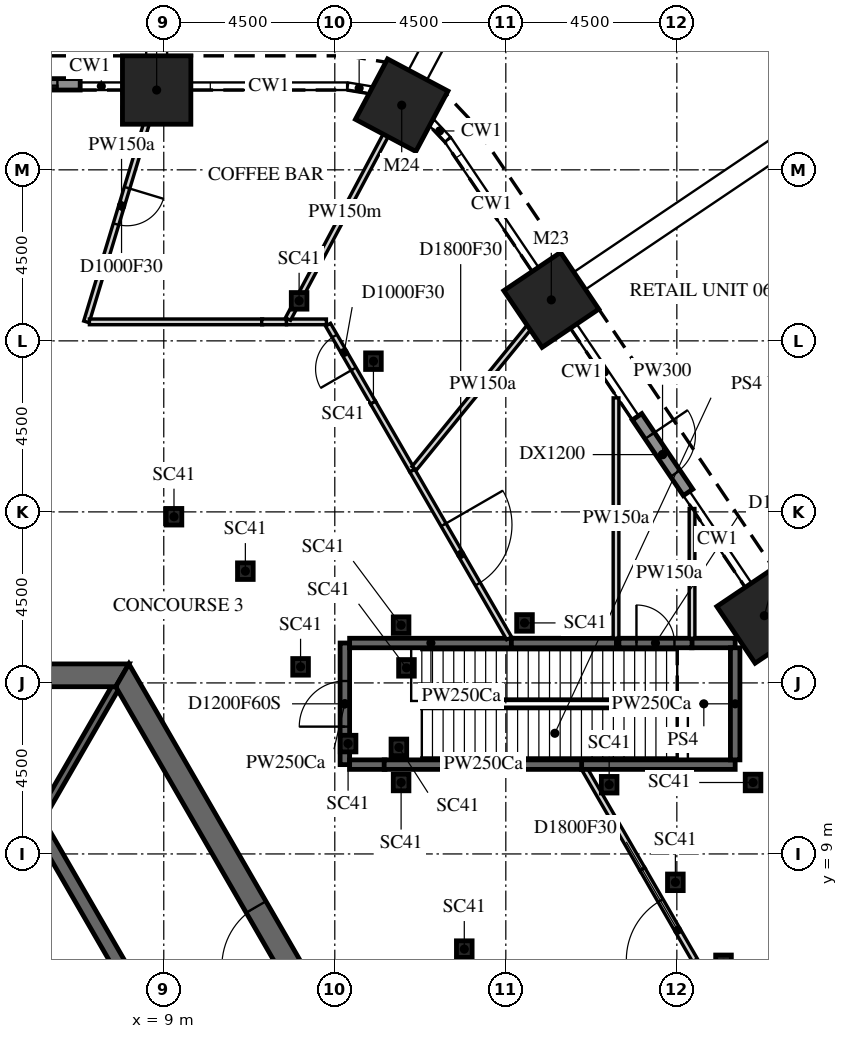
"""IFC4 building model, lengths in metres.
Left out: names, types, materials, properties, quantities, classifications, styles, units other than length and angle.
Written with IfcOpenShell. Run it as: python <this file> out.ifc"""

import sys

from ifc_helpers import new_model, si_unit, direction, frame, frame_2d, origin, origin_2d, place, context, subcontext, project, spatial, polyline, rectangle, i_section, outline, extrude, element, fill, save


model = new_model("IFC4")
c1 = context("Model", 3, precision=1e-05, world=origin(), true_north=direction((0.0, 1.0)))
c2 = subcontext(c1, "Body", "Model", "MODEL_VIEW")
j1 = project(units=[si_unit("LENGTHUNIT", "METRE"), si_unit("PLANEANGLEUNIT", "RADIAN")], contexts=[c1])
p1 = place(None, origin())
s1 = spatial("IfcSite", under=j1, at=p1, CompositionType="ELEMENT")
p2 = place(p1, origin())
s2 = spatial("IfcBuilding", under=s1, at=p2, CompositionType="ELEMENT")
p3 = place(p2, origin())
s3 = spatial("IfcBuildingStorey", under=s2, at=p3, CompositionType="ELEMENT", Elevation=0.0)
for number, where, z_axis, x_axis in (
    (1, (8.812, 29.1, -2.1), (0.0, 0.0, 1.0), (1.0, 0.0, 0.0)),
    (2, (24.802, 15.269, -2.1), (0.0, 0.0, 1.0), (0.559, -0.829, 0.0)),
    (3, (19.197, 23.579, -2.1), (0.0, 0.0, 1.0), (0.559, -0.829, 0.0)),
    (4, (15.26, 28.701, -2.1), (0.0, 0.0, 1.0), (0.883, -0.469, 0.0)),
):
    element("IfcColumn", number, at=place(p3, frame(where, z_axis=z_axis, x_axis=x_axis)), inside=s3, PredefinedType="COLUMN", context=c2, shape_type="SweptSolid", body=[
        extrude(rectangle(XDim=1.8, YDim=1.8, at=origin_2d()), origin(), (0.0, 0.0, 1.0), 10.85),
    ])
for number, where, z_axis, x_axis in (
    (5, (23.728, 6.122, -2.1), (0.0, 0.0, 1.0), (1.0, 0.0, 0.0)),
    (6, (12.6, 13.923, -2.1), (0.0, 0.0, 1.0), (1.0, 0.0, 0.0)),
    (7, (11.147, 16.441, -2.1), (0.0, 0.0, 1.0), (1.0, 0.0, 0.0)),
    (8, (14.517, 21.966, -2.1), (0.0, 0.0, 1.0), (1.0, 0.0, 0.0)),
    (9, (18.492, 15.079, -2.1), (0.0, 0.0, 1.0), (1.0, 0.0, 0.0)),
    (10, (24.505, 10.88, -2.1), (0.0, 0.0, 1.0), (1.0, 0.0, 0.0)),
    (11, (20.719, 10.821, -2.1), (0.0, 0.0, 1.0), (1.0, 0.0, 0.0)),
    (12, (22.461, 8.253, -2.1), (0.0, 0.0, 1.0), (1.0, 0.0, 0.0)),
    (13, (16.907, 6.496, -2.1), (0.0, 0.0, 1.0), (1.0, 0.0, 0.0)),
    (14, (13.85, 11.904, -2.1), (0.0, 0.0, 1.0), (1.0, 0.0, 0.0)),
    (15, (15.186, 11.804, -2.1), (0.0, 0.0, 1.0), (1.0, 0.0, 0.0)),
    (16, (15.386, 13.896, -2.1), (0.0, 0.0, 1.0), (1.0, 0.0, 0.0)),
    (17, (12.561, 23.553, -2.1), (0.0, 0.0, 1.0), (1.0, 0.0, 0.0)),
    (18, (9.269, 17.872, -2.1), (0.0, 0.0, 1.0), (1.0, 0.0, 0.0)),
    (19, (15.245, 10.88, -2.1), (0.0, 0.0, 1.0), (1.0, 0.0, 0.0)),
    (20, (15.245, 15.02, -2.1), (0.0, 0.0, 1.0), (1.0, 0.0, 0.0)),
):
    element("IfcColumn", number, at=place(p3, frame(where, z_axis=z_axis, x_axis=x_axis)), inside=s3, PredefinedType="COLUMN", context=c2, shape_type="SweptSolid", body=[
        extrude(i_section(OverallWidth=0.412, OverallDepth=0.437, WebThickness=0.036, FlangeThickness=0.058, FilletRadius=0.015, at=origin_2d()), origin(), (0.0, 0.0, 1.0), 10.85),
    ])
p4 = place(p3, frame((6.801, 29.25, 0.0), z_axis=(0.0, 0.0, 1.0), x_axis=(-1.0, 0.0, 0.0)))
e21 = element("IfcWall", 21, at=p4, inside=s3, PredefinedType="SOLIDWALL", context=c2, shape_type="SweptSolid", body=[
    extrude(rectangle(XDim=6.0, YDim=0.3, at=frame_2d((3.0, 0.0))), origin(), (0.0, 0.0, 1.0), 7.823),
])
p5 = place(p4, frame((0.6, 0.0, 0.0)))
e22 = element("IfcOpeningElement", 22, at=p5, cuts=e21, PredefinedType="OPENING", context=c2, shape_type="SweptSolid", body=[
    extrude(rectangle(XDim=4.8, YDim=4.5, at=frame_2d((2.4, 2.25))), frame((0.0, 0.16, 0.0), z_axis=(0.0, -1.0, 0.0), x_axis=(1.0, 0.0, 0.0)), (0.0, 0.0, 1.0), 0.32),
])
p6 = place(p3, frame((21.453, 20.502, 0.0), z_axis=(0.0, 0.0, 1.0), x_axis=(0.559175815241, -0.829049098456, 0.0)))
e23 = element("IfcWall", 23, at=p6, inside=s3, PredefinedType="SOLIDWALL", context=c2, shape_type="SweptSolid", body=[
    extrude(rectangle(XDim=2.4, YDim=0.3, at=frame_2d((1.2, 0.0))), origin(), (0.0, 0.0, 1.0), 7.823),
])
p7 = place(p6, frame((0.6, 0.0, 0.0)))
e24 = element("IfcOpeningElement", 24, at=p7, cuts=e23, PredefinedType="OPENING", context=c2, shape_type="SweptSolid", body=[
    extrude(rectangle(XDim=1.2, YDim=2.1, at=frame_2d((0.6, 1.05))), frame((0.0, 0.16, 0.0), z_axis=(0.0, -1.0, 0.0), x_axis=(1.0, 0.0, 0.0)), (0.0, 0.0, 1.0), 0.32),
])
p8 = place(p3, frame((15.819, 0.0, -2.1), z_axis=(0.0, 0.0, 1.0), x_axis=(-0.499999880136, 0.866025472988, 0.0)))
e25 = element("IfcWall", 25, at=p8, inside=s3, PredefinedType="SHEAR", context=c2, shape_type="SweptSolid", body=[
    extrude(outline(polyline([(-0.173, -0.3), (15.993, -0.3), (15.646, 0.3), (0.173, 0.3), (-0.173, -0.3)])), origin(), (0.0, 0.0, 1.0), 10.85),
])
p9 = place(p8, frame((6.981, 0.0, 2.1)))
e26 = element("IfcOpeningElement", 26, at=p9, cuts=e25, PredefinedType="OPENING", context=c2, shape_type="SweptSolid", body=[
    extrude(rectangle(XDim=1.8, YDim=2.4, at=frame_2d((0.9, 1.2))), frame((0.0, 0.31, 0.0), z_axis=(0.0, -1.0, 0.0), x_axis=(1.0, 0.0, 0.0)), (0.0, 0.0, 1.0), 0.62),
])
p10 = place(p3, frame((7.91, 13.7, -2.1), z_axis=(0.0, 0.0, 1.0), x_axis=(-1.0, 0.0, 0.0)))
e27 = element("IfcWall", 27, at=p10, inside=s3, PredefinedType="SHEAR", context=c2, shape_type="SweptSolid", body=[
    extrude(outline(polyline([(-0.173, -0.3), (15.993, -0.3), (15.646, 0.3), (0.173, 0.3), (-0.173, -0.3)])), origin(), (0.0, 0.0, 1.0), 10.85),
])
p11 = place(p10, frame((7.31, 0.0, 2.1)))
e28 = element("IfcOpeningElement", 28, at=p11, cuts=e27, PredefinedType="OPENING", context=c2, shape_type="SweptSolid", body=[
    extrude(rectangle(XDim=1.2, YDim=2.4, at=frame_2d((0.6, 1.2))), frame((0.0, 0.31, 0.0), z_axis=(0.0, -1.0, 0.0), x_axis=(1.0, 0.0, 0.0)), (0.0, 0.0, 1.0), 0.62),
])
p12 = place(p3, frame((11.345, 0.0, -2.1), z_axis=(0.0, 0.0, 1.0), x_axis=(-0.499995046907, 0.866028263435, 0.0)))
e29 = element("IfcWall", 29, at=p12, inside=s3, PredefinedType="SHEAR", context=c2, shape_type="SweptSolid", body=[
    extrude(outline(polyline([(-0.101, -0.175), (11.446, -0.175), (11.244, 0.175), (0.101, 0.175), (-0.101, -0.175)])), origin(), (0.0, 0.0, 1.0), 10.85),
])
p13 = place(p12, frame((4.744, 0.0, 2.1)))
e30 = element("IfcOpeningElement", 30, at=p13, cuts=e29, PredefinedType="OPENING", context=c2, shape_type="SweptSolid", body=[
    extrude(rectangle(XDim=1.8, YDim=2.4, at=frame_2d((0.9, 1.2))), frame((0.0, 0.185, 0.0), z_axis=(0.0, -1.0, 0.0), x_axis=(1.0, 0.0, 0.0)), (0.0, 0.0, 1.0), 0.37),
])
p14 = place(p3, frame((5.773, 10.0, -2.1), z_axis=(0.0, 0.0, 1.0), x_axis=(0.500038251005, 0.86600331843, 0.0)))
e31 = element("IfcWall", 31, at=p14, inside=s3, PredefinedType="SHEAR", context=c2, shape_type="SweptSolid", body=[
    extrude(rectangle(XDim=3.926, YDim=0.2, at=frame_2d((1.963, 0.0))), origin(), (0.0, 0.0, 1.0), 10.85),
])
p15 = place(p3, frame((8.813, 29.1, 0.0), z_axis=(0.0, 0.0, 1.0), x_axis=(-0.289919157487, -0.957051138718, 0.0)))
e32 = element("IfcWall", 32, at=p15, inside=s3, PredefinedType="PARTITIONING", context=c2, shape_type="SweptSolid", body=[
    extrude(rectangle(XDim=6.374, YDim=0.15, at=frame_2d((3.187, 0.0))), origin(), (0.0, 0.0, 1.0), 8.75),
])
p16 = place(p15, frame((2.687, 0.0, 0.0)))
e33 = element("IfcOpeningElement", 33, at=p16, cuts=e32, PredefinedType="OPENING", context=c2, shape_type="SweptSolid", body=[
    extrude(rectangle(XDim=1.0, YDim=2.1, at=frame_2d((0.5, 1.05))), frame((0.0, 0.085, 0.0), z_axis=(0.0, -1.0, 0.0), x_axis=(1.0, 0.0, 0.0)), (0.0, 0.0, 1.0), 0.17),
])
p17 = place(p3, frame((11.599, 23.0, 0.0), z_axis=(0.0, 0.0, 1.0), x_axis=(-1.0, 0.0, 0.0)))
e34 = element("IfcWall", 34, at=p17, inside=s3, PredefinedType="PARTITIONING", context=c2, shape_type="SweptSolid", body=[
    extrude(rectangle(XDim=4.556, YDim=0.15, at=frame_2d((2.278, 0.0))), origin(), (0.0, 0.0, 1.0), 8.75),
])
p18 = place(p3, frame((12.229, 23.0, 0.0), z_axis=(0.0, 0.0, 1.0), x_axis=(-1.0, 0.0, 0.0)))
e35 = element("IfcWall", 35, at=p18, inside=s3, PredefinedType="PARTITIONING", context=c2, shape_type="SweptSolid", body=[
    extrude(rectangle(XDim=0.652, YDim=0.15, at=frame_2d((0.326, 0.0))), origin(), (0.0, 0.0, 1.0), 8.75),
])
p19 = place(p3, frame((13.279, 23.0, 0.0), z_axis=(0.0, 0.0, 1.0), x_axis=(-1.0, 0.0, 0.0)))
e36 = element("IfcWall", 36, at=p19, inside=s3, PredefinedType="PARTITIONING", context=c2, shape_type="SweptSolid", body=[
    extrude(rectangle(XDim=1.05, YDim=0.15, at=frame_2d((0.525, 0.0))), origin(), (0.0, 0.0, 1.0), 8.75),
])
p20 = place(p3, frame((13.765, 11.35, 0.0), z_axis=(0.0, 0.0, 1.0), x_axis=(0.0, 1.0, 0.0)))
e37 = element("IfcWall", 37, at=p20, inside=s3, PredefinedType="PARTITIONING", context=c2, shape_type="SweptSolid", body=[
    extrude(rectangle(XDim=3.2, YDim=0.25, at=frame_2d((1.6, 0.0))), origin(), (0.0, 0.0, 1.0), 8.75),
])
p21 = place(p20, frame((1.0, 0.0, 0.0)))
e38 = element("IfcOpeningElement", 38, at=p21, cuts=e37, PredefinedType="OPENING", context=c2, shape_type="SweptSolid", body=[
    extrude(rectangle(XDim=1.2, YDim=2.1, at=frame_2d((0.6, 1.05))), frame((0.0, 0.135, 0.0), z_axis=(0.0, -1.0, 0.0), x_axis=(1.0, 0.0, 0.0)), (0.0, 0.0, 1.0), 0.27),
])
p22 = place(p3, frame((13.89, 14.55, 0.0), z_axis=(0.0, 0.0, 1.0), x_axis=(1.0, 0.0, 0.0)))
e39 = element("IfcWall", 39, at=p22, inside=s3, PredefinedType="PARTITIONING", context=c2, shape_type="SweptSolid", body=[
    extrude(rectangle(XDim=4.278, YDim=0.25, at=frame_2d((2.139, 0.0))), origin(), (0.0, 0.0, 1.0), 8.75),
])
p23 = place(p3, frame((14.516, 20.858, 0.0), z_axis=(0.0, 0.0, 1.0), x_axis=(-0.500120827299, 0.865955632871, 0.0)))
e40 = element("IfcWall", 40, at=p23, inside=s3, PredefinedType="PARTITIONING", context=c2, shape_type="SweptSolid", body=[
    extrude(rectangle(XDim=2.387, YDim=0.15, at=frame_2d((1.194, 0.0))), origin(), (0.0, 0.0, 1.0), 8.75),
])
p24 = place(p23, frame((1.043, 0.0, 0.0)))
e41 = element("IfcOpeningElement", 41, at=p24, cuts=e40, PredefinedType="OPENING", context=c2, shape_type="SweptSolid", body=[
    extrude(rectangle(XDim=1.0, YDim=2.1, at=frame_2d((0.5, 1.05))), frame((0.0, 0.085, 0.0), z_axis=(0.0, -1.0, 0.0), x_axis=(1.0, 0.0, 0.0)), (0.0, 0.0, 1.0), 0.17),
])
p25 = place(p3, frame((14.821, 11.35, 0.0), z_axis=(0.0, 0.0, 1.0), x_axis=(-1.0, 0.0, 0.0)))
e42 = element("IfcWall", 42, at=p25, inside=s3, PredefinedType="PARTITIONING", context=c2, shape_type="SweptSolid", body=[
    extrude(rectangle(XDim=0.931, YDim=0.25, at=frame_2d((0.466, 0.0))), origin(), (0.0, 0.0, 1.0), 8.75),
])
p26 = place(p3, frame((15.261, 28.701, 0.0), z_axis=(0.0, 0.0, 1.0), x_axis=(-0.469569765, -0.88289537081, 0.0)))
e43 = element("IfcWall", 43, at=p26, inside=s3, PredefinedType="PARTITIONING", context=c2, shape_type="SweptSolid", body=[
    extrude(rectangle(XDim=6.372, YDim=0.15, at=frame_2d((3.186, 0.0))), origin(), (0.0, 0.0, 1.0), 8.297),
])
p27 = place(p3, frame((15.539, 19.086, 0.0), z_axis=(0.0, 0.0, 1.0), x_axis=(-0.500049439734, 0.865996857859, 0.0)))
e44 = element("IfcWall", 44, at=p27, inside=s3, PredefinedType="PARTITIONING", context=c2, shape_type="SweptSolid", body=[
    extrude(rectangle(XDim=2.068, YDim=0.15, at=frame_2d((1.034, 0.0))), origin(), (0.0, 0.0, 1.0), 8.75),
])
p28 = place(p3, frame((18.146, 14.55, 0.0), z_axis=(0.0, 0.0, 1.0), x_axis=(1.0, 0.0, 0.0)))
e45 = element("IfcWall", 45, at=p28, inside=s3, PredefinedType="PARTITIONING", context=c2, shape_type="SweptSolid", body=[
    extrude(rectangle(XDim=2.764, YDim=0.25, at=frame_2d((1.382, 0.0))), origin(), (0.0, 0.0, 1.0), 8.75),
])
p29 = place(p3, frame((15.539, 19.086, 0.0), z_axis=(0.0, 0.0, 1.0), x_axis=(0.500036405339, -0.866004384132, 0.0)))
e46 = element("IfcWall", 46, at=p29, inside=s3, PredefinedType="PARTITIONING", context=c2, shape_type="SweptSolid", body=[
    extrude(rectangle(XDim=5.093, YDim=0.15, at=frame_2d((2.547, 0.0))), origin(), (0.0, 0.0, 1.0), 8.75),
])
p30 = place(p29, frame((1.647, 0.0, 0.0)))
e47 = element("IfcOpeningElement", 47, at=p30, cuts=e46, PredefinedType="OPENING", context=c2, shape_type="SweptSolid", body=[
    extrude(rectangle(XDim=1.8, YDim=2.1, at=frame_2d((0.9, 1.05))), frame((0.0, 0.085, 0.0), z_axis=(0.0, -1.0, 0.0), x_axis=(1.0, 0.0, 0.0)), (0.0, 0.0, 1.0), 0.17),
])
p31 = place(p3, frame((19.197, 23.578, 0.0), z_axis=(0.0, 0.0, 1.0), x_axis=(-0.631467457847, -0.775402379208, 0.0)))
e48 = element("IfcWall", 48, at=p31, inside=s3, PredefinedType="PARTITIONING", context=c2, shape_type="SweptSolid", body=[
    extrude(rectangle(XDim=5.713, YDim=0.15, at=frame_2d((2.856, 0.0))), origin(), (0.0, 0.0, 1.0), 8.75),
])
p32 = place(p3, frame((20.017, 11.35, 0.0), z_axis=(0.0, 0.0, 1.0), x_axis=(-1.0, 0.0, 0.0)))
e49 = element("IfcWall", 49, at=p32, inside=s3, PredefinedType="PARTITIONING", context=c2, shape_type="SweptSolid", body=[
    extrude(rectangle(XDim=5.218, YDim=0.25, at=frame_2d((2.609, 0.0))), origin(), (0.0, 0.0, 1.0), 8.75),
])
p33 = place(p3, frame((20.9, 14.675, 0.0), z_axis=(0.0, 0.0, 1.0), x_axis=(0.0, 1.0, 0.0)))
e50 = element("IfcWall", 50, at=p33, inside=s3, PredefinedType="PARTITIONING", context=c2, shape_type="SweptSolid", body=[
    extrude(rectangle(XDim=6.325, YDim=0.15, at=frame_2d((3.163, 0.0))), origin(), (0.0, 0.0, 1.0), 8.75),
])
p34 = place(p3, frame((21.603, 8.582, 0.0), z_axis=(0.0, 0.0, 1.0), x_axis=(-0.499976360077, 0.86603905187, 0.0)))
e51 = element("IfcWall", 51, at=p34, inside=s3, PredefinedType="PARTITIONING", context=c2, shape_type="SweptSolid", body=[
    extrude(rectangle(XDim=3.052, YDim=0.15, at=frame_2d((1.526, 0.0))), origin(), (0.0, 0.0, 1.0), 8.75),
])
p35 = place(p3, frame((22.89, 14.55, 0.0), z_axis=(0.0, 0.0, 1.0), x_axis=(1.0, 0.0, 0.0)))
e52 = element("IfcWall", 52, at=p35, inside=s3, PredefinedType="PARTITIONING", context=c2, shape_type="SweptSolid", body=[
    extrude(rectangle(XDim=1.145, YDim=0.25, at=frame_2d((0.573, 0.0))), origin(), (0.0, 0.0, 1.0), 8.75),
])
p36 = place(p3, frame((20.975, 14.55, 0.0), z_axis=(0.0, 0.0, 1.0), x_axis=(1.0, 0.0, 0.0)))
e53 = element("IfcWall", 53, at=p36, inside=s3, PredefinedType="PARTITIONING", context=c2, shape_type="SweptSolid", body=[
    extrude(rectangle(XDim=1.925, YDim=0.25, at=frame_2d((0.962, 0.0))), origin(), (0.0, 0.0, 1.0), 8.75),
])
p37 = place(p36, frame((0.462, 0.0, 0.0)))
e54 = element("IfcOpeningElement", 54, at=p37, cuts=e53, PredefinedType="OPENING", context=c2, shape_type="SweptSolid", body=[
    extrude(rectangle(XDim=1.0, YDim=2.1, at=frame_2d((0.5, 1.05))), frame((0.0, 0.135, 0.0), z_axis=(0.0, -1.0, 0.0), x_axis=(1.0, 0.0, 0.0)), (0.0, 0.0, 1.0), 0.27),
])
p38 = place(p3, frame((22.9, 18.089, 0.0), z_axis=(0.0, 0.0, 1.0), x_axis=(0.0, -1.0, 0.0)))
e55 = element("IfcWall", 55, at=p38, inside=s3, PredefinedType="PARTITIONING", context=c2, shape_type="SweptSolid", body=[
    extrude(rectangle(XDim=3.414, YDim=0.15, at=frame_2d((1.707, 0.0))), origin(), (0.0, 0.0, 1.0), 8.75),
])
p39 = place(p3, frame((23.449, 5.386, 0.0), z_axis=(0.0, 0.0, 1.0), x_axis=(-0.500058396869, 0.865991685711, 0.0)))
e56 = element("IfcWall", 56, at=p39, inside=s3, PredefinedType="PARTITIONING", context=c2, shape_type="SweptSolid", body=[
    extrude(rectangle(XDim=3.711, YDim=0.15, at=frame_2d((1.856, 0.0))), origin(), (0.0, 0.0, 1.0), 8.75),
])
p40 = place(p39, frame((0.956, 0.0, 0.0)))
e57 = element("IfcOpeningElement", 57, at=p40, cuts=e56, PredefinedType="OPENING", context=c2, shape_type="SweptSolid", body=[
    extrude(rectangle(XDim=1.8, YDim=2.1, at=frame_2d((0.9, 1.05))), frame((0.0, 0.085, 0.0), z_axis=(0.0, -1.0, 0.0), x_axis=(1.0, 0.0, 0.0)), (0.0, 0.0, 1.0), 0.17),
])
p41 = place(p3, frame((24.035, 11.35, 0.0), z_axis=(0.0, 0.0, 1.0), x_axis=(-1.0, 0.0, 0.0)))
e58 = element("IfcWall", 58, at=p41, inside=s3, PredefinedType="PARTITIONING", context=c2, shape_type="SweptSolid", body=[
    extrude(rectangle(XDim=4.04, YDim=0.25, at=frame_2d((2.02, 0.0))), origin(), (0.0, 0.0, 1.0), 8.75),
])
p42 = place(p3, frame((24.035, 14.425, 0.0), z_axis=(0.0, 0.0, 1.0), x_axis=(0.0, -1.0, 0.0)))
e59 = element("IfcWall", 59, at=p42, inside=s3, PredefinedType="PARTITIONING", context=c2, shape_type="SweptSolid", body=[
    extrude(rectangle(XDim=2.95, YDim=0.25, at=frame_2d((1.475, 0.0))), origin(), (0.0, 0.0, 1.0), 8.75),
])
p43 = place(p3, frame((30.407, 6.958, 0.0), z_axis=(0.0, 0.0, 1.0), x_axis=(-0.974801082726, -0.223075881967, 0.0)))
e60 = element("IfcWall", 60, at=p43, inside=s3, PredefinedType="PARTITIONING", context=c2, shape_type="SweptSolid", body=[
    extrude(rectangle(XDim=7.049, YDim=0.15, at=frame_2d((3.525, 0.0))), origin(), (0.0, 0.0, 1.0), 8.75),
])
p44 = place(p5, frame((0.0, -0.025, 0.0)))
e61 = element("IfcDoor", 61, at=p44, inside=s3, OperationType="DOUBLE_DOOR_SLIDING", PredefinedType="DOOR", context=c2, shape_type="SweptSolid", body=[
    extrude(rectangle(XDim=4.8, YDim=4.5, at=frame_2d((2.4, 2.25))), frame((0.0, 0.025, 0.0), z_axis=(0.0, -1.0, 0.0), x_axis=(1.0, 0.0, 0.0)), (0.0, 0.0, 1.0), 0.05),
])
fill(e22, e61)
p45 = place(p7, frame((0.0, -0.025, 0.0)))
e62 = element("IfcDoor", 62, at=p45, inside=s3, OperationType="SINGLE_SWING_LEFT", PredefinedType="DOOR", context=c2, shape_type="SweptSolid", body=[
    extrude(rectangle(XDim=1.2, YDim=2.1, at=frame_2d((0.6, 1.05))), frame((0.0, 0.025, 0.0), z_axis=(0.0, -1.0, 0.0), x_axis=(1.0, 0.0, 0.0)), (0.0, 0.0, 1.0), 0.05),
])
fill(e24, e62)
p46 = place(p9, origin())
e63 = element("IfcDoor", 63, at=p46, inside=s3, OperationType="DOUBLE_DOOR_SINGLE_SWING", PredefinedType="DOOR", context=c2, shape_type="SweptSolid", body=[
    extrude(rectangle(XDim=1.8, YDim=2.4, at=frame_2d((0.9, 1.2))), frame((0.0, 0.025, 0.0), z_axis=(0.0, -1.0, 0.0), x_axis=(1.0, 0.0, 0.0)), (0.0, 0.0, 1.0), 0.05),
])
fill(e26, e63)
p47 = place(p16, origin())
e64 = element("IfcDoor", 64, at=p47, inside=s3, OperationType="SINGLE_SWING_RIGHT", PredefinedType="DOOR", context=c2, shape_type="SweptSolid", body=[
    extrude(rectangle(XDim=1.0, YDim=2.1, at=frame_2d((0.5, 1.05))), frame((0.0, 0.025, 0.0), z_axis=(0.0, -1.0, 0.0), x_axis=(1.0, 0.0, 0.0)), (0.0, 0.0, 1.0), 0.05),
])
fill(e33, e64)
p48 = place(p21, origin())
e65 = element("IfcDoor", 65, at=p48, inside=s3, OperationType="SINGLE_SWING_RIGHT", PredefinedType="DOOR", context=c2, shape_type="SweptSolid", body=[
    extrude(rectangle(XDim=1.2, YDim=2.1, at=frame_2d((0.6, 1.05))), frame((0.0, 0.025, 0.0), z_axis=(0.0, -1.0, 0.0), x_axis=(1.0, 0.0, 0.0)), (0.0, 0.0, 1.0), 0.05),
])
fill(e38, e65)
p49 = place(p24, origin())
e66 = element("IfcDoor", 66, at=p49, inside=s3, OperationType="SINGLE_SWING_LEFT", PredefinedType="DOOR", context=c2, shape_type="SweptSolid", body=[
    extrude(rectangle(XDim=1.0, YDim=2.1, at=frame_2d((0.5, 1.05))), frame((0.0, 0.025, 0.0), z_axis=(0.0, -1.0, 0.0), x_axis=(1.0, 0.0, 0.0)), (0.0, 0.0, 1.0), 0.05),
])
fill(e41, e66)
p50 = place(p30, origin())
e67 = element("IfcDoor", 67, at=p50, inside=s3, OperationType="DOUBLE_DOOR_SINGLE_SWING", PredefinedType="DOOR", context=c2, shape_type="SweptSolid", body=[
    extrude(rectangle(XDim=1.8, YDim=2.1, at=frame_2d((0.9, 1.05))), frame((0.0, 0.025, 0.0), z_axis=(0.0, -1.0, 0.0), x_axis=(1.0, 0.0, 0.0)), (0.0, 0.0, 1.0), 0.05),
])
fill(e47, e67)
p51 = place(p37, origin())
e68 = element("IfcDoor", 68, at=p51, inside=s3, OperationType="SINGLE_SWING_LEFT", PredefinedType="DOOR", context=c2, shape_type="SweptSolid", body=[
    extrude(rectangle(XDim=1.0, YDim=2.1, at=frame_2d((0.5, 1.05))), frame((0.0, 0.025, 0.0), z_axis=(0.0, -1.0, 0.0), x_axis=(1.0, 0.0, 0.0)), (0.0, 0.0, 1.0), 0.05),
])
fill(e54, e68)
p52 = place(p40, origin())
e69 = element("IfcDoor", 69, at=p52, inside=s3, OperationType="DOUBLE_DOOR_SINGLE_SWING", PredefinedType="DOOR", context=c2, shape_type="SweptSolid", body=[
    extrude(rectangle(XDim=1.8, YDim=2.1, at=frame_2d((0.9, 1.05))), frame((0.0, 0.025, 0.0), z_axis=(0.0, -1.0, 0.0), x_axis=(1.0, 0.0, 0.0)), (0.0, 0.0, 1.0), 0.05),
])
fill(e57, e69)
save(model, sys.argv[1])
